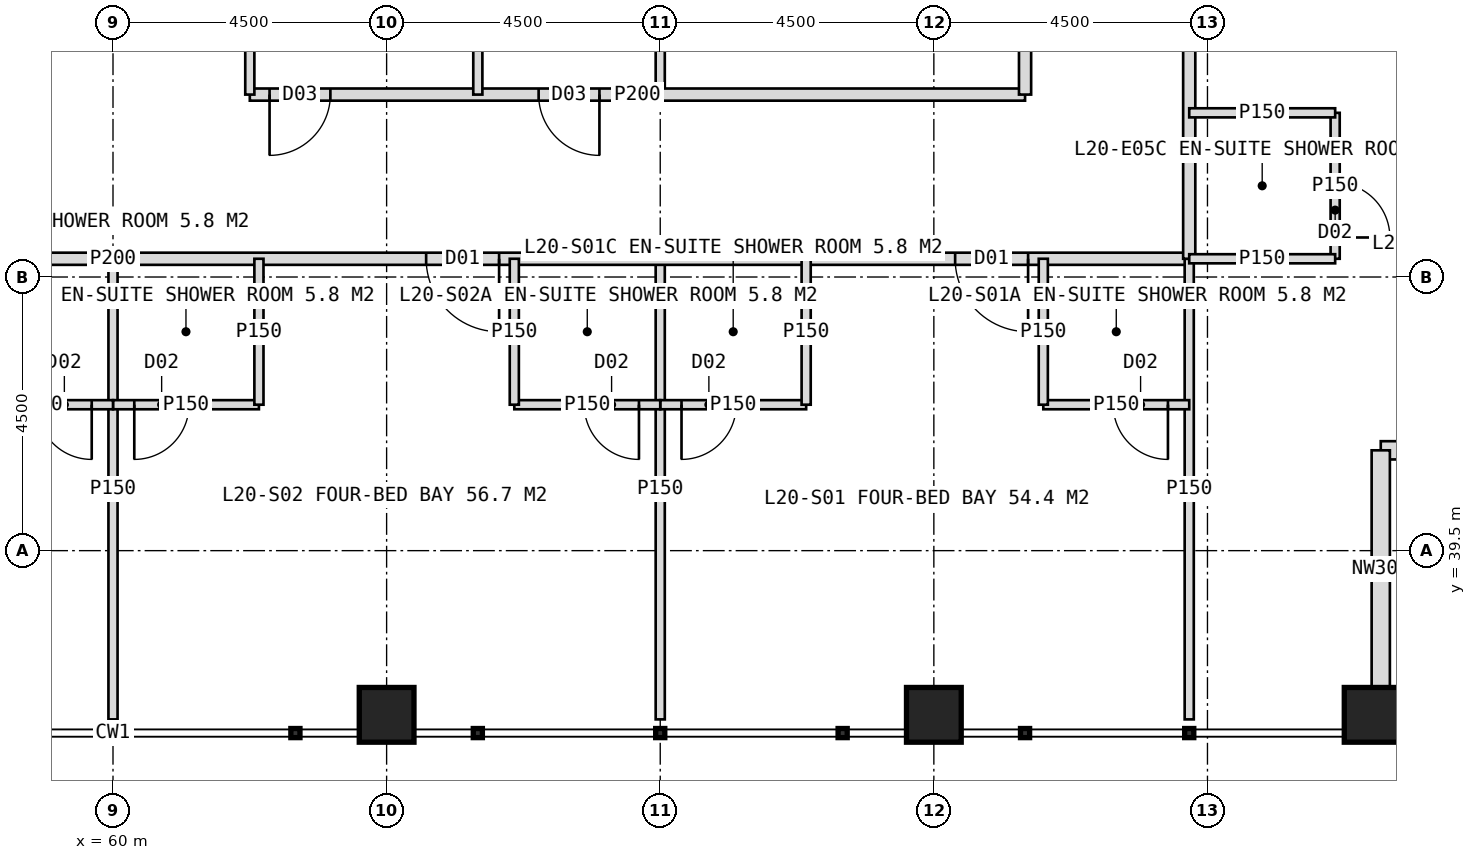
"""IFC4 building model, lengths in metres.
Left out: names, types, materials, properties, quantities, classifications, styles, units other than length and angle.
Written with IfcOpenShell. Run it as: python <this file> out.ifc"""

import sys

from ifc_helpers import new_model, si_unit, direction, frame, frame_2d, origin, origin_2d, place, context, subcontext, project, spatial, rectangle, hollow_rectangle, extrude, element, fill, save


model = new_model("IFC4")
c1 = context("Model", 3, precision=1e-05, world=origin(), true_north=direction((0.0, 1.0)))
c2 = subcontext(c1, "Body", "Model", "MODEL_VIEW")
j1 = project(units=[si_unit("LENGTHUNIT", "METRE"), si_unit("PLANEANGLEUNIT", "RADIAN")], contexts=[c1])
p1 = place(None, origin())
s1 = spatial("IfcSite", under=j1, at=p1, CompositionType="ELEMENT")
p2 = place(p1, origin())
s2 = spatial("IfcBuilding", under=s1, at=p2, CompositionType="ELEMENT")
p3 = place(p2, frame((0.0, 0.0, 87.0)))
s3 = spatial("IfcBuildingStorey", under=s2, at=p3, CompositionType="ELEMENT", Elevation=87.0)
for number, where, z_axis, x_axis in (
    (1, (64.5, 36.8, 0.0), (0.0, 0.0, 1.0), (1.0, 0.0, 0.0)),
    (2, (73.5, 36.8, 0.0), (0.0, 0.0, 1.0), (1.0, 0.0, 0.0)),
    (3, (80.7, 36.8, 0.0), (0.0, 0.0, 1.0), (1.0, 0.0, 0.0)),
):
    element("IfcColumn", number, at=place(p3, frame(where, z_axis=z_axis, x_axis=x_axis)), inside=s3, PredefinedType="COLUMN", context=c2, shape_type="SweptSolid", body=[
        extrude(hollow_rectangle(XDim=0.9, YDim=0.9, WallThickness=0.08, at=origin_2d()), origin(), (0.0, 0.0, 1.0), 4.0),
    ])
for number, where, z_axis, x_axis in (
    (4, (84.75, 41.15, 0.0), (0.0, 0.0, 1.0), (-1.0, 0.0, 0.0)),
    (5, (80.85, 41.15, 0.0), (0.0, 0.0, 1.0), (0.0, -1.0, 0.0)),
):
    element("IfcWall", number, at=place(p3, frame(where, z_axis=z_axis, x_axis=x_axis)), inside=s3, PredefinedType="ELEMENTEDWALL", context=c2, shape_type="SweptSolid", body=[
        extrude(rectangle(XDim=3.9, YDim=0.3, at=frame_2d((1.95, 0.0))), origin(), (0.0, 0.0, 1.0), 2.95),
    ])
p4 = place(p3, frame((69.0, 44.3, 0.0), z_axis=(0.0, 0.0, 1.0), x_axis=(0.0, -1.0, 0.0)))
e6 = element("IfcWall", 6, at=p4, inside=s3, PredefinedType="PARTITIONING", context=c2, shape_type="SweptSolid", body=[
    extrude(rectangle(XDim=7.575, YDim=0.15, at=frame_2d((3.788, 0.0))), origin(), (0.0, 0.0, 1.0), 3.75),
])
p5 = place(p3, frame((60.0, 44.3, 0.0), z_axis=(0.0, 0.0, 1.0), x_axis=(0.0, -1.0, 0.0)))
e7 = element("IfcWall", 7, at=p5, inside=s3, PredefinedType="PARTITIONING", context=c2, shape_type="SweptSolid", body=[
    extrude(rectangle(XDim=7.575, YDim=0.15, at=frame_2d((3.788, 0.0))), origin(), (0.0, 0.0, 1.0), 2.75),
])
p6 = place(p3, frame((77.7, 44.3, 0.0), z_axis=(0.0, 0.0, 1.0), x_axis=(-1.0, 0.0, 0.0)))
e8 = element("IfcWall", 8, at=p6, inside=s3, PredefinedType="PARTITIONING", context=c2, shape_type="SweptSolid", body=[
    extrude(rectangle(XDim=35.4, YDim=0.2, at=frame_2d((17.7, 0.0))), origin(), (0.0, 0.0, 1.0), 3.75),
])
p7 = place(p6, frame((2.65, 0.0, 0.0)))
e9 = element("IfcOpeningElement", 9, at=p7, cuts=e8, PredefinedType="OPENING", context=c2, shape_type="SweptSolid", body=[
    extrude(rectangle(XDim=1.2, YDim=2.2, at=frame_2d((0.6, 1.1))), frame((0.0, 0.11, 0.0), z_axis=(0.0, -1.0, 0.0), x_axis=(1.0, 0.0, 0.0)), (0.0, 0.0, 1.0), 0.22),
])
p8 = place(p6, frame((11.35, 0.0, 0.0)))
e10 = element("IfcOpeningElement", 10, at=p8, cuts=e8, PredefinedType="OPENING", context=c2, shape_type="SweptSolid", body=[
    extrude(rectangle(XDim=1.2, YDim=2.2, at=frame_2d((0.6, 1.1))), frame((0.0, 0.11, 0.0), z_axis=(0.0, -1.0, 0.0), x_axis=(1.0, 0.0, 0.0)), (0.0, 0.0, 1.0), 0.22),
])
p9 = place(p6, frame((20.35, 0.0, 0.0)))
e11 = element("IfcOpeningElement", 11, at=p9, cuts=e8, PredefinedType="OPENING", context=c2, shape_type="SweptSolid", body=[
    extrude(rectangle(XDim=1.2, YDim=2.2, at=frame_2d((0.6, 1.1))), frame((0.0, 0.11, 0.0), z_axis=(0.0, -1.0, 0.0), x_axis=(1.0, 0.0, 0.0)), (0.0, 0.0, 1.0), 0.22),
])
p10 = place(p6, frame((29.35, 0.0, 0.0)))
e12 = element("IfcOpeningElement", 12, at=p10, cuts=e8, PredefinedType="OPENING", context=c2, shape_type="SweptSolid", body=[
    extrude(rectangle(XDim=1.2, YDim=2.2, at=frame_2d((0.6, 1.1))), frame((0.0, 0.11, 0.0), z_axis=(0.0, -1.0, 0.0), x_axis=(1.0, 0.0, 0.0)), (0.0, 0.0, 1.0), 0.22),
])
p11 = place(p3, frame((77.7, 44.3, 0.0), z_axis=(0.0, 0.0, 1.0), x_axis=(0.0, -1.0, 0.0)))
e13 = element("IfcWall", 13, at=p11, inside=s3, PredefinedType="PARTITIONING", context=c2, shape_type="SweptSolid", body=[
    extrude(rectangle(XDim=7.575, YDim=0.15, at=frame_2d((3.788, 0.0))), origin(), (0.0, 0.0, 1.0), 3.75),
])
p12 = place(p3, frame((77.7, 41.9, 0.0), z_axis=(0.0, 0.0, 1.0), x_axis=(-1.0, 0.0, 0.0)))
e14 = element("IfcWall", 14, at=p12, inside=s3, PredefinedType="PARTITIONING", context=c2, shape_type="SweptSolid", body=[
    extrude(rectangle(XDim=2.4, YDim=0.15, at=frame_2d((1.2, 0.0))), origin(), (0.0, 0.0, 1.0), 3.75),
])
p13 = place(p12, frame((0.35, 0.0, 0.0)))
e15 = element("IfcOpeningElement", 15, at=p13, cuts=e14, PredefinedType="OPENING", context=c2, shape_type="SweptSolid", body=[
    extrude(rectangle(XDim=0.9, YDim=2.1, at=frame_2d((0.45, 1.05))), frame((0.0, 0.085, 0.0), z_axis=(0.0, -1.0, 0.0), x_axis=(1.0, 0.0, 0.0)), (0.0, 0.0, 1.0), 0.17),
])
p14 = place(p3, frame((75.3, 44.3, 0.0), z_axis=(0.0, 0.0, 1.0), x_axis=(0.0, -1.0, 0.0)))
e16 = element("IfcWall", 16, at=p14, inside=s3, PredefinedType="PARTITIONING", context=c2, shape_type="SweptSolid", body=[
    extrude(rectangle(XDim=2.4, YDim=0.15, at=frame_2d((1.2, 0.0))), origin(), (0.0, 0.0, 1.0), 3.75),
])
p15 = place(p3, frame((71.4, 41.9, 0.0), z_axis=(0.0, 0.0, 1.0), x_axis=(-1.0, 0.0, 0.0)))
e17 = element("IfcWall", 17, at=p15, inside=s3, PredefinedType="PARTITIONING", context=c2, shape_type="SweptSolid", body=[
    extrude(rectangle(XDim=2.4, YDim=0.15, at=frame_2d((1.2, 0.0))), origin(), (0.0, 0.0, 1.0), 3.75),
])
p16 = place(p15, frame((1.15, 0.0, 0.0)))
e18 = element("IfcOpeningElement", 18, at=p16, cuts=e17, PredefinedType="OPENING", context=c2, shape_type="SweptSolid", body=[
    extrude(rectangle(XDim=0.9, YDim=2.1, at=frame_2d((0.45, 1.05))), frame((0.0, 0.085, 0.0), z_axis=(0.0, -1.0, 0.0), x_axis=(1.0, 0.0, 0.0)), (0.0, 0.0, 1.0), 0.17),
])
p17 = place(p3, frame((71.4, 44.3, 0.0), z_axis=(0.0, 0.0, 1.0), x_axis=(0.0, -1.0, 0.0)))
e19 = element("IfcWall", 19, at=p17, inside=s3, PredefinedType="PARTITIONING", context=c2, shape_type="SweptSolid", body=[
    extrude(rectangle(XDim=2.4, YDim=0.15, at=frame_2d((1.2, 0.0))), origin(), (0.0, 0.0, 1.0), 3.75),
])
p18 = place(p3, frame((69.0, 41.9, 0.0), z_axis=(0.0, 0.0, 1.0), x_axis=(-1.0, 0.0, 0.0)))
e20 = element("IfcWall", 20, at=p18, inside=s3, PredefinedType="PARTITIONING", context=c2, shape_type="SweptSolid", body=[
    extrude(rectangle(XDim=2.4, YDim=0.15, at=frame_2d((1.2, 0.0))), origin(), (0.0, 0.0, 1.0), 3.75),
])
p19 = place(p18, frame((0.35, 0.0, 0.0)))
e21 = element("IfcOpeningElement", 21, at=p19, cuts=e20, PredefinedType="OPENING", context=c2, shape_type="SweptSolid", body=[
    extrude(rectangle(XDim=0.9, YDim=2.1, at=frame_2d((0.45, 1.05))), frame((0.0, 0.085, 0.0), z_axis=(0.0, -1.0, 0.0), x_axis=(1.0, 0.0, 0.0)), (0.0, 0.0, 1.0), 0.17),
])
p20 = place(p3, frame((66.6, 44.3, 0.0), z_axis=(0.0, 0.0, 1.0), x_axis=(0.0, -1.0, 0.0)))
e22 = element("IfcWall", 22, at=p20, inside=s3, PredefinedType="PARTITIONING", context=c2, shape_type="SweptSolid", body=[
    extrude(rectangle(XDim=2.4, YDim=0.15, at=frame_2d((1.2, 0.0))), origin(), (0.0, 0.0, 1.0), 3.75),
])
p21 = place(p3, frame((62.4, 41.9, 0.0), z_axis=(0.0, 0.0, 1.0), x_axis=(-1.0, 0.0, 0.0)))
e23 = element("IfcWall", 23, at=p21, inside=s3, PredefinedType="PARTITIONING", context=c2, shape_type="SweptSolid", body=[
    extrude(rectangle(XDim=2.4, YDim=0.15, at=frame_2d((1.2, 0.0))), origin(), (0.0, 0.0, 1.0), 3.75),
])
p22 = place(p21, frame((1.15, 0.0, 0.0)))
e24 = element("IfcOpeningElement", 24, at=p22, cuts=e23, PredefinedType="OPENING", context=c2, shape_type="SweptSolid", body=[
    extrude(rectangle(XDim=0.9, YDim=2.1, at=frame_2d((0.45, 1.05))), frame((0.0, 0.085, 0.0), z_axis=(0.0, -1.0, 0.0), x_axis=(1.0, 0.0, 0.0)), (0.0, 0.0, 1.0), 0.17),
])
p23 = place(p3, frame((62.4, 44.3, 0.0), z_axis=(0.0, 0.0, 1.0), x_axis=(0.0, -1.0, 0.0)))
e25 = element("IfcWall", 25, at=p23, inside=s3, PredefinedType="PARTITIONING", context=c2, shape_type="SweptSolid", body=[
    extrude(rectangle(XDim=2.4, YDim=0.15, at=frame_2d((1.2, 0.0))), origin(), (0.0, 0.0, 1.0), 3.75),
])
p24 = place(p3, frame((60.0, 41.9, 0.0), z_axis=(0.0, 0.0, 1.0), x_axis=(-1.0, 0.0, 0.0)))
e26 = element("IfcWall", 26, at=p24, inside=s3, PredefinedType="PARTITIONING", context=c2, shape_type="SweptSolid", body=[
    extrude(rectangle(XDim=2.4, YDim=0.15, at=frame_2d((1.2, 0.0))), origin(), (0.0, 0.0, 1.0), 3.75),
])
p25 = place(p24, frame((0.35, 0.0, 0.0)))
e27 = element("IfcOpeningElement", 27, at=p25, cuts=e26, PredefinedType="OPENING", context=c2, shape_type="SweptSolid", body=[
    extrude(rectangle(XDim=0.9, YDim=2.1, at=frame_2d((0.45, 1.05))), frame((0.0, 0.085, 0.0), z_axis=(0.0, -1.0, 0.0), x_axis=(1.0, 0.0, 0.0)), (0.0, 0.0, 1.0), 0.17),
])
p26 = place(p3, frame((69.0, 53.0, 0.0), z_axis=(0.0, 0.0, 1.0), x_axis=(0.0, -1.0, 0.0)))
e28 = element("IfcWall", 28, at=p26, inside=s3, PredefinedType="PARTITIONING", context=c2, shape_type="SweptSolid", body=[
    extrude(rectangle(XDim=6.0, YDim=0.15, at=frame_2d((3.0, 0.0))), origin(), (0.0, 0.0, 1.0), 3.75),
])
p27 = place(p3, frame((75.0, 47.0, 0.0), z_axis=(0.0, 0.0, 1.0), x_axis=(-1.0, 0.0, 0.0)))
e29 = element("IfcWall", 29, at=p27, inside=s3, PredefinedType="PARTITIONING", context=c2, shape_type="SweptSolid", body=[
    extrude(rectangle(XDim=12.75, YDim=0.2, at=frame_2d((6.375, 0.0))), origin(), (0.0, 0.0, 1.0), 3.75),
])
p28 = place(p27, frame((7.0, 0.0, 0.0)))
e30 = element("IfcOpeningElement", 30, at=p28, cuts=e29, PredefinedType="OPENING", context=c2, shape_type="SweptSolid", body=[
    extrude(rectangle(XDim=1.0, YDim=2.1, at=frame_2d((0.5, 1.05))), frame((0.0, 0.11, 0.0), z_axis=(0.0, -1.0, 0.0), x_axis=(1.0, 0.0, 0.0)), (0.0, 0.0, 1.0), 0.22),
])
p29 = place(p27, frame((11.425, 0.0, 0.0)))
e31 = element("IfcOpeningElement", 31, at=p29, cuts=e29, PredefinedType="OPENING", context=c2, shape_type="SweptSolid", body=[
    extrude(rectangle(XDim=1.0, YDim=2.1, at=frame_2d((0.5, 1.05))), frame((0.0, 0.11, 0.0), z_axis=(0.0, -1.0, 0.0), x_axis=(1.0, 0.0, 0.0)), (0.0, 0.0, 1.0), 0.22),
])
p30 = place(p3, frame((62.25, 53.0, 0.0), z_axis=(0.0, 0.0, 1.0), x_axis=(0.0, -1.0, 0.0)))
e32 = element("IfcWall", 32, at=p30, inside=s3, PredefinedType="PARTITIONING", context=c2, shape_type="SweptSolid", body=[
    extrude(rectangle(XDim=6.0, YDim=0.15, at=frame_2d((3.0, 0.0))), origin(), (0.0, 0.0, 1.0), 3.75),
])
p31 = place(p30, frame((0.6, 0.0, 0.0)))
e33 = element("IfcOpeningElement", 33, at=p31, cuts=e32, PredefinedType="OPENING", context=c2, shape_type="SweptSolid", body=[
    extrude(rectangle(XDim=0.9, YDim=2.1, at=frame_2d((0.45, 1.05))), frame((0.0, 0.085, 0.0), z_axis=(0.0, -1.0, 0.0), x_axis=(1.0, 0.0, 0.0)), (0.0, 0.0, 1.0), 0.17),
])
p32 = place(p3, frame((66.0, 53.0, 0.0), z_axis=(0.0, 0.0, 1.0), x_axis=(0.0, -1.0, 0.0)))
e34 = element("IfcWall", 34, at=p32, inside=s3, PredefinedType="PARTITIONING", context=c2, shape_type="SweptSolid", body=[
    extrude(rectangle(XDim=6.0, YDim=0.15, at=frame_2d((3.0, 0.0))), origin(), (0.0, 0.0, 1.0), 3.75),
])
p33 = place(p3, frame((77.7, 79.7, 0.0), z_axis=(0.0, 0.0, 1.0), x_axis=(0.0, -1.0, 0.0)))
e35 = element("IfcWall", 35, at=p33, inside=s3, PredefinedType="PARTITIONING", context=c2, shape_type="SweptSolid", body=[
    extrude(rectangle(XDim=35.4, YDim=0.2, at=frame_2d((17.7, 0.0))), origin(), (0.0, 0.0, 1.0), 3.75),
])
p34 = place(p33, frame((2.65, 0.0, 0.0)))
e36 = element("IfcOpeningElement", 36, at=p34, cuts=e35, PredefinedType="OPENING", context=c2, shape_type="SweptSolid", body=[
    extrude(rectangle(XDim=1.2, YDim=2.2, at=frame_2d((0.6, 1.1))), frame((0.0, 0.11, 0.0), z_axis=(0.0, -1.0, 0.0), x_axis=(1.0, 0.0, 0.0)), (0.0, 0.0, 1.0), 0.22),
])
p35 = place(p33, frame((8.35, 0.0, 0.0)))
e37 = element("IfcOpeningElement", 37, at=p35, cuts=e35, PredefinedType="OPENING", context=c2, shape_type="SweptSolid", body=[
    extrude(rectangle(XDim=1.2, YDim=2.2, at=frame_2d((0.6, 1.1))), frame((0.0, 0.11, 0.0), z_axis=(0.0, -1.0, 0.0), x_axis=(1.0, 0.0, 0.0)), (0.0, 0.0, 1.0), 0.22),
])
p36 = place(p33, frame((14.35, 0.0, 0.0)))
e38 = element("IfcOpeningElement", 38, at=p36, cuts=e35, PredefinedType="OPENING", context=c2, shape_type="SweptSolid", body=[
    extrude(rectangle(XDim=1.2, YDim=2.2, at=frame_2d((0.6, 1.1))), frame((0.0, 0.11, 0.0), z_axis=(0.0, -1.0, 0.0), x_axis=(1.0, 0.0, 0.0)), (0.0, 0.0, 1.0), 0.22),
])
p37 = place(p33, frame((20.35, 0.0, 0.0)))
e39 = element("IfcOpeningElement", 39, at=p37, cuts=e35, PredefinedType="OPENING", context=c2, shape_type="SweptSolid", body=[
    extrude(rectangle(XDim=1.2, YDim=2.2, at=frame_2d((0.6, 1.1))), frame((0.0, 0.11, 0.0), z_axis=(0.0, -1.0, 0.0), x_axis=(1.0, 0.0, 0.0)), (0.0, 0.0, 1.0), 0.22),
])
p38 = place(p33, frame((29.35, 0.0, 0.0)))
e40 = element("IfcOpeningElement", 40, at=p38, cuts=e35, PredefinedType="OPENING", context=c2, shape_type="SweptSolid", body=[
    extrude(rectangle(XDim=1.2, YDim=2.2, at=frame_2d((0.6, 1.1))), frame((0.0, 0.11, 0.0), z_axis=(0.0, -1.0, 0.0), x_axis=(1.0, 0.0, 0.0)), (0.0, 0.0, 1.0), 0.22),
])
p39 = place(p3, frame((80.1, 46.7, 0.0), z_axis=(0.0, 0.0, 1.0), x_axis=(0.0, -1.0, 0.0)))
e41 = element("IfcWall", 41, at=p39, inside=s3, PredefinedType="PARTITIONING", context=c2, shape_type="SweptSolid", body=[
    extrude(rectangle(XDim=2.4, YDim=0.15, at=frame_2d((1.2, 0.0))), origin(), (0.0, 0.0, 1.0), 3.75),
])
p40 = place(p39, frame((1.15, 0.0, 0.0)))
e42 = element("IfcOpeningElement", 42, at=p40, cuts=e41, PredefinedType="OPENING", context=c2, shape_type="SweptSolid", body=[
    extrude(rectangle(XDim=0.9, YDim=2.1, at=frame_2d((0.45, 1.05))), frame((0.0, 0.085, 0.0), z_axis=(0.0, -1.0, 0.0), x_axis=(1.0, 0.0, 0.0)), (0.0, 0.0, 1.0), 0.17),
])
for number, where, z_axis, x_axis in (
    (43, (77.7, 46.7, 0.0), (0.0, 0.0, 1.0), (1.0, 0.0, 0.0)),
    (44, (77.7, 44.3, 0.0), (0.0, 0.0, 1.0), (1.0, 0.0, 0.0)),
):
    element("IfcWall", number, at=place(p3, frame(where, z_axis=z_axis, x_axis=x_axis)), inside=s3, PredefinedType="PARTITIONING", context=c2, shape_type="SweptSolid", body=[
        extrude(rectangle(XDim=2.4, YDim=0.15, at=frame_2d((1.2, 0.0))), origin(), (0.0, 0.0, 1.0), 3.75),
    ])
p41 = place(p3, frame((75.0, 62.0, 0.0), z_axis=(0.0, 0.0, 1.0), x_axis=(0.0, -1.0, 0.0)))
e45 = element("IfcWall", 45, at=p41, inside=s3, PredefinedType="PARTITIONING", context=c2, shape_type="SweptSolid", body=[
    extrude(rectangle(XDim=15.0, YDim=0.2, at=frame_2d((7.5, 0.0))), origin(), (0.0, 0.0, 1.0), 3.75),
])
p42 = place(p41, frame((7.3, 0.0, 0.0)))
e46 = element("IfcOpeningElement", 46, at=p42, cuts=e45, PredefinedType="OPENING", context=c2, shape_type="SweptSolid", body=[
    extrude(rectangle(XDim=1.0, YDim=2.1, at=frame_2d((0.5, 1.05))), frame((0.0, 0.11, 0.0), z_axis=(0.0, -1.0, 0.0), x_axis=(1.0, 0.0, 0.0)), (0.0, 0.0, 1.0), 0.22),
])
p43 = place(p41, frame((11.2, 0.0, 0.0)))
e47 = element("IfcOpeningElement", 47, at=p43, cuts=e45, PredefinedType="OPENING", context=c2, shape_type="SweptSolid", body=[
    extrude(rectangle(XDim=1.0, YDim=2.1, at=frame_2d((0.5, 1.05))), frame((0.0, 0.11, 0.0), z_axis=(0.0, -1.0, 0.0), x_axis=(1.0, 0.0, 0.0)), (0.0, 0.0, 1.0), 0.22),
])
p44 = place(p7, origin())
e48 = element("IfcDoor", 48, at=p44, inside=s3, OperationType="SINGLE_SWING_LEFT", PredefinedType="DOOR", context=c2, shape_type="SweptSolid", body=[
    extrude(rectangle(XDim=1.2, YDim=2.2, at=frame_2d((0.6, 1.1))), frame((0.0, 0.025, 0.0), z_axis=(0.0, -1.0, 0.0), x_axis=(1.0, 0.0, 0.0)), (0.0, 0.0, 1.0), 0.05),
])
fill(e9, e48)
p45 = place(p13, origin())
e49 = element("IfcDoor", 49, at=p45, inside=s3, OperationType="SINGLE_SWING_LEFT", PredefinedType="DOOR", context=c2, shape_type="SweptSolid", body=[
    extrude(rectangle(XDim=0.9, YDim=2.1, at=frame_2d((0.45, 1.05))), frame((0.0, 0.025, 0.0), z_axis=(0.0, -1.0, 0.0), x_axis=(1.0, 0.0, 0.0)), (0.0, 0.0, 1.0), 0.05),
])
fill(e15, e49)
p46 = place(p16, origin())
e50 = element("IfcDoor", 50, at=p46, inside=s3, OperationType="SINGLE_SWING_RIGHT", PredefinedType="DOOR", context=c2, shape_type="SweptSolid", body=[
    extrude(rectangle(XDim=0.9, YDim=2.1, at=frame_2d((0.45, 1.05))), frame((0.0, 0.025, 0.0), z_axis=(0.0, -1.0, 0.0), x_axis=(1.0, 0.0, 0.0)), (0.0, 0.0, 1.0), 0.05),
])
fill(e18, e50)
p47 = place(p8, origin())
e51 = element("IfcDoor", 51, at=p47, inside=s3, OperationType="SINGLE_SWING_LEFT", PredefinedType="DOOR", context=c2, shape_type="SweptSolid", body=[
    extrude(rectangle(XDim=1.2, YDim=2.2, at=frame_2d((0.6, 1.1))), frame((0.0, 0.025, 0.0), z_axis=(0.0, -1.0, 0.0), x_axis=(1.0, 0.0, 0.0)), (0.0, 0.0, 1.0), 0.05),
])
fill(e10, e51)
p48 = place(p19, origin())
e52 = element("IfcDoor", 52, at=p48, inside=s3, OperationType="SINGLE_SWING_LEFT", PredefinedType="DOOR", context=c2, shape_type="SweptSolid", body=[
    extrude(rectangle(XDim=0.9, YDim=2.1, at=frame_2d((0.45, 1.05))), frame((0.0, 0.025, 0.0), z_axis=(0.0, -1.0, 0.0), x_axis=(1.0, 0.0, 0.0)), (0.0, 0.0, 1.0), 0.05),
])
fill(e21, e52)
p49 = place(p22, origin())
e53 = element("IfcDoor", 53, at=p49, inside=s3, OperationType="SINGLE_SWING_RIGHT", PredefinedType="DOOR", context=c2, shape_type="SweptSolid", body=[
    extrude(rectangle(XDim=0.9, YDim=2.1, at=frame_2d((0.45, 1.05))), frame((0.0, 0.025, 0.0), z_axis=(0.0, -1.0, 0.0), x_axis=(1.0, 0.0, 0.0)), (0.0, 0.0, 1.0), 0.05),
])
fill(e24, e53)
p50 = place(p25, origin())
e54 = element("IfcDoor", 54, at=p50, inside=s3, OperationType="SINGLE_SWING_LEFT", PredefinedType="DOOR", context=c2, shape_type="SweptSolid", body=[
    extrude(rectangle(XDim=0.9, YDim=2.1, at=frame_2d((0.45, 1.05))), frame((0.0, 0.025, 0.0), z_axis=(0.0, -1.0, 0.0), x_axis=(1.0, 0.0, 0.0)), (0.0, 0.0, 1.0), 0.05),
])
fill(e27, e54)
p51 = place(p28, origin())
e55 = element("IfcDoor", 55, at=p51, inside=s3, OperationType="SINGLE_SWING_LEFT", PredefinedType="DOOR", context=c2, shape_type="SweptSolid", body=[
    extrude(rectangle(XDim=1.0, YDim=2.1, at=frame_2d((0.5, 1.05))), frame((0.0, 0.025, 0.0), z_axis=(0.0, -1.0, 0.0), x_axis=(1.0, 0.0, 0.0)), (0.0, 0.0, 1.0), 0.05),
])
fill(e30, e55)
p52 = place(p29, origin())
e56 = element("IfcDoor", 56, at=p52, inside=s3, OperationType="SINGLE_SWING_RIGHT", PredefinedType="DOOR", context=c2, shape_type="SweptSolid", body=[
    extrude(rectangle(XDim=1.0, YDim=2.1, at=frame_2d((0.5, 1.05))), frame((0.0, 0.025, 0.0), z_axis=(0.0, -1.0, 0.0), x_axis=(1.0, 0.0, 0.0)), (0.0, 0.0, 1.0), 0.05),
])
fill(e31, e56)
p53 = place(p40, origin())
e57 = element("IfcDoor", 57, at=p53, inside=s3, OperationType="SINGLE_SWING_RIGHT", PredefinedType="DOOR", context=c2, shape_type="SweptSolid", body=[
    extrude(rectangle(XDim=0.9, YDim=2.1, at=frame_2d((0.45, 1.05))), frame((0.0, 0.025, 0.0), z_axis=(0.0, -1.0, 0.0), x_axis=(1.0, 0.0, 0.0)), (0.0, 0.0, 1.0), 0.05),
])
fill(e42, e57)
save(model, sys.argv[1])
